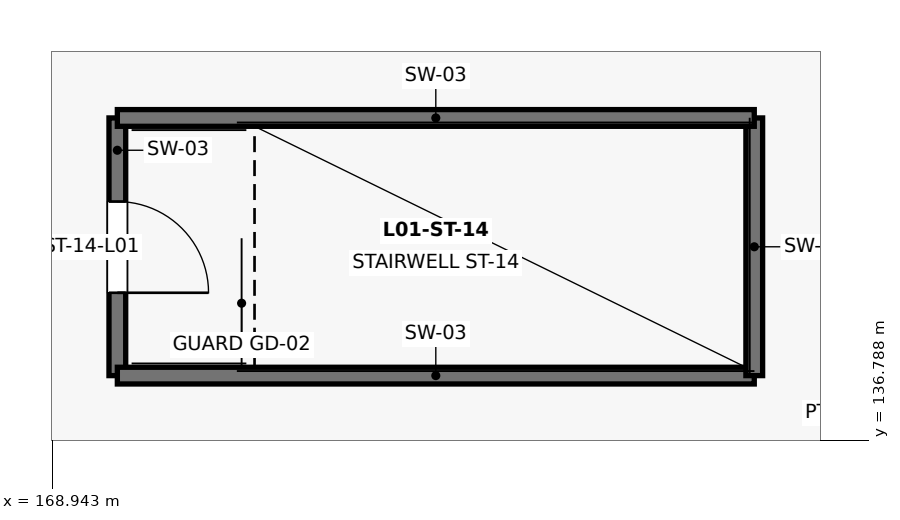
"""IFC4 building model, lengths in metres.
Left out: names, types, materials, properties, quantities, classifications, styles, units other than length and angle.
Written with IfcOpenShell. Run it as: python <this file> out.ifc"""

import sys

from ifc_helpers import new_model, si_unit, direction, frame, frame_2d, origin, place, context, subcontext, project, spatial, rectangle, extrude, element, fill, save


model = new_model("IFC4")
c1 = context("Model", 3, precision=1e-05, world=origin(), true_north=direction((0.0, 1.0)))
c2 = subcontext(c1, "Body", "Model", "MODEL_VIEW")
j1 = project(units=[si_unit("LENGTHUNIT", "METRE"), si_unit("PLANEANGLEUNIT", "RADIAN")], contexts=[c1])
p1 = place(None, origin())
s1 = spatial("IfcSite", under=j1, at=p1, CompositionType="ELEMENT")
p2 = place(p1, origin())
s2 = spatial("IfcBuilding", under=s1, at=p2, CompositionType="ELEMENT")
p3 = place(p2, frame((0.0, 0.0, 6.6)))
s3 = spatial("IfcBuildingStorey", under=s2, at=p3, CompositionType="ELEMENT", Elevation=6.6)
p4 = place(p3, frame((169.8, 141.03, 0.0), z_axis=(0.0, 0.0, 1.0), x_axis=(0.0, -1.0, 0.0)))
e1 = element("IfcWall", 1, at=p4, inside=s3, PredefinedType="SHEAR", context=c2, shape_type="SweptSolid", body=[
    extrude(rectangle(XDim=3.39, YDim=0.22, at=frame_2d((1.695, 0.0))), origin(), (0.0, 0.0, 1.0), 4.59),
])
p5 = place(p4, frame((1.1, 0.0, 0.0)))
e2 = element("IfcOpeningElement", 2, at=p5, cuts=e1, PredefinedType="OPENING", context=c2, shape_type="SweptSolid", body=[
    extrude(rectangle(XDim=1.2, YDim=2.2, at=frame_2d((0.6, 1.1))), frame((0.0, 0.125, 0.0), z_axis=(0.0, -1.0, 0.0), x_axis=(1.0, 0.0, 0.0)), (0.0, 0.0, 1.0), 0.25),
])
p6 = place(p3, frame((169.8, 137.64, 0.0), z_axis=(0.0, 0.0, 1.0), x_axis=(1.0, 0.0, 0.0)))
e3 = element("IfcWall", 3, at=p6, inside=s3, PredefinedType="SHEAR", context=c2, shape_type="SweptSolid", body=[
    extrude(rectangle(XDim=8.38, YDim=0.22, at=frame_2d((4.19, 0.0))), origin(), (0.0, 0.0, 1.0), 4.59),
])
p7 = place(p3, frame((178.18, 137.64, 0.0), z_axis=(0.0, 0.0, 1.0), x_axis=(0.0, 1.0, 0.0)))
e4 = element("IfcWall", 4, at=p7, inside=s3, PredefinedType="SHEAR", context=c2, shape_type="SweptSolid", body=[
    extrude(rectangle(XDim=3.39, YDim=0.22, at=frame_2d((1.695, 0.0))), origin(), (0.0, 0.0, 1.0), 4.59),
])
p8 = place(p3, frame((178.18, 141.03, 0.0), z_axis=(0.0, 0.0, 1.0), x_axis=(-1.0, 0.0, 0.0)))
e5 = element("IfcWall", 5, at=p8, inside=s3, PredefinedType="SHEAR", context=c2, shape_type="SweptSolid", body=[
    extrude(rectangle(XDim=8.38, YDim=0.22, at=frame_2d((4.19, 0.0))), origin(), (0.0, 0.0, 1.0), 4.59),
])
p9 = place(p5, origin())
e6 = element("IfcDoor", 6, at=p9, inside=s3, OperationType="SINGLE_SWING_RIGHT", PredefinedType="DOOR", context=c2, shape_type="SweptSolid", body=[
    extrude(rectangle(XDim=1.2, YDim=2.2, at=frame_2d((0.6, 1.1))), frame((0.0, 0.025, 0.0), z_axis=(0.0, -1.0, 0.0), x_axis=(1.0, 0.0, 0.0)), (0.0, 0.0, 1.0), 0.05),
])
fill(e2, e6)
save(model, sys.argv[1])
